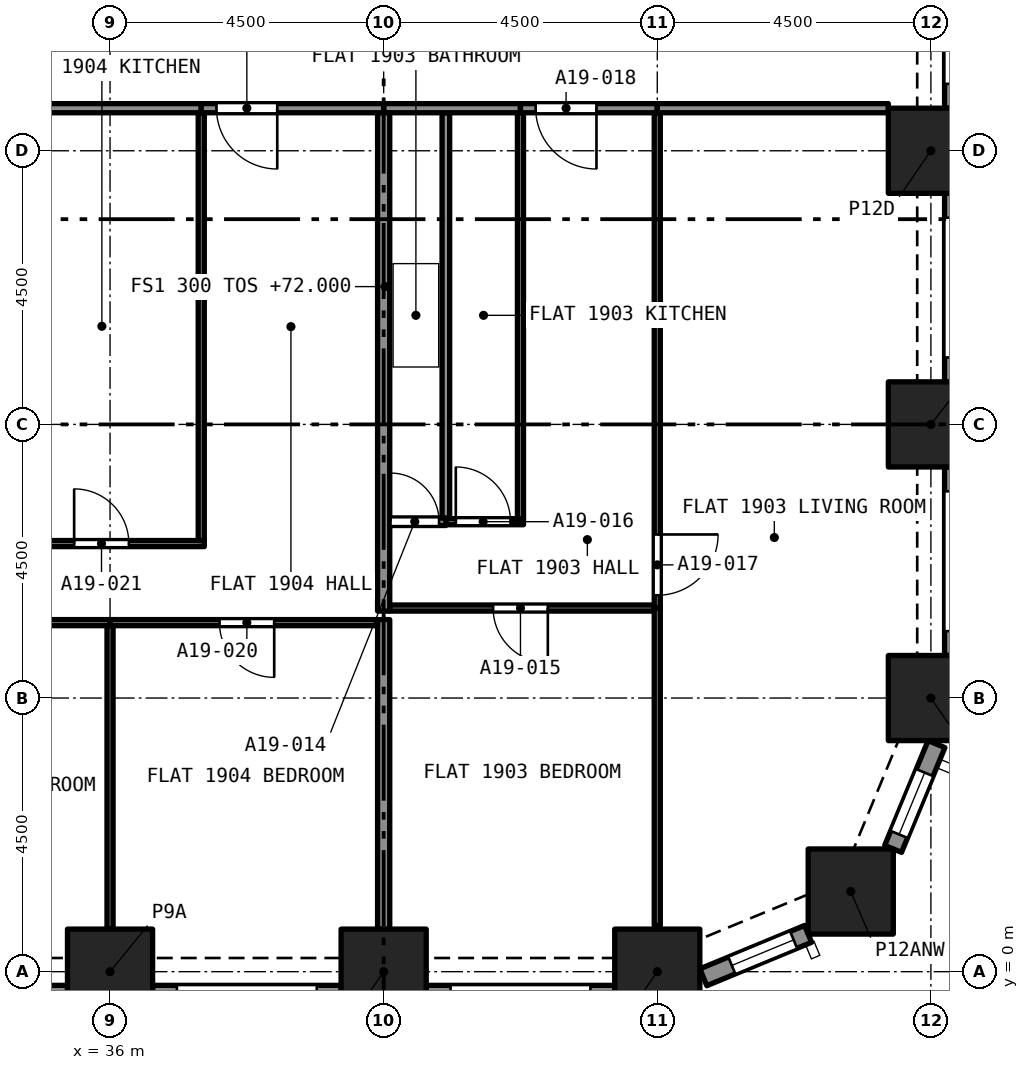
"""IFC4 building model, lengths in metres.
Left out: names, types, materials, properties, quantities, classifications, styles, units other than length and angle.
Written with IfcOpenShell. Run it as: python <this file> out.ifc"""

import sys

from ifc_helpers import new_model, si_unit, direction, frame, frame_2d, origin, origin_2d, place, context, subcontext, project, spatial, rectangle, extrude, element, fill, save


model = new_model("IFC4")
c1 = context("Model", 3, precision=1e-05, world=origin(), true_north=direction((0.0, 1.0)))
c2 = subcontext(c1, "Body", "Model", "MODEL_VIEW")
j1 = project(units=[si_unit("LENGTHUNIT", "METRE"), si_unit("PLANEANGLEUNIT", "RADIAN")], contexts=[c1])
p1 = place(None, origin())
s1 = spatial("IfcSite", under=j1, at=p1, CompositionType="ELEMENT")
p2 = place(p1, origin())
s2 = spatial("IfcBuilding", under=s1, at=p2, CompositionType="ELEMENT")
p3 = place(p2, frame((0.0, 0.0, 72.0)))
s3 = spatial("IfcBuildingStorey", under=s2, at=p3, CompositionType="ELEMENT", Elevation=72.0)
for number, where, z_axis, x_axis in (
    (1, (36.0, 0.0, 0.0), (0.0, 0.0, 1.0), (1.0, 0.0, 0.0)),
    (2, (40.5, 0.0, 0.0), (0.0, 0.0, 1.0), (1.0, 0.0, 0.0)),
    (3, (45.0, 0.0, 0.0), (0.0, 0.0, 1.0), (1.0, 0.0, 0.0)),
    (4, (48.182, 1.318, 0.0), (0.0, 0.0, 1.0), (1.0, 0.0, 0.0)),
    (5, (49.5, 4.5, 0.0), (0.0, 0.0, 1.0), (1.0, 0.0, 0.0)),
    (6, (49.5, 9.0, 0.0), (0.0, 0.0, 1.0), (1.0, 0.0, 0.0)),
    (7, (49.5, 13.5, 0.0), (0.0, 0.0, 1.0), (1.0, 0.0, 0.0)),
):
    element("IfcColumn", number, at=place(p3, frame(where, z_axis=z_axis, x_axis=x_axis)), inside=s3, PredefinedType="COLUMN", context=c2, shape_type="SweptSolid", body=[
        extrude(rectangle(XDim=1.4, YDim=1.4, at=origin_2d()), origin(), (0.0, 0.0, 1.0), 3.2),
    ])
p4 = place(p3, frame((35.3, -0.375, 0.0), z_axis=(0.0, 0.0, 1.0), x_axis=(-1.0, 0.0, 0.0)))
e8 = element("IfcWall", 8, at=p4, inside=s3, PredefinedType="SOLIDWALL", context=c2, shape_type="SweptSolid", body=[
    extrude(rectangle(XDim=3.1, YDim=0.3, at=frame_2d((1.55, 0.0))), origin(), (0.0, 0.0, 1.0), 3.2),
])
p5 = place(p4, frame((0.4, 0.0, 0.45)))
e9 = element("IfcOpeningElement", 9, at=p5, cuts=e8, PredefinedType="OPENING", context=c2, shape_type="SweptSolid", body=[
    extrude(rectangle(XDim=2.3, YDim=1.95, at=frame_2d((1.15, 0.975))), frame((0.0, 0.16, 0.0), z_axis=(0.0, -1.0, 0.0), x_axis=(1.0, 0.0, 0.0)), (0.0, 0.0, 1.0), 0.32),
])
p6 = place(p3, frame((39.8, -0.375, 0.0), z_axis=(0.0, 0.0, 1.0), x_axis=(-1.0, 0.0, 0.0)))
e10 = element("IfcWall", 10, at=p6, inside=s3, PredefinedType="SOLIDWALL", context=c2, shape_type="SweptSolid", body=[
    extrude(rectangle(XDim=3.1, YDim=0.3, at=frame_2d((1.55, 0.0))), origin(), (0.0, 0.0, 1.0), 3.2),
])
p7 = place(p6, frame((0.4, 0.0, 0.45)))
e11 = element("IfcOpeningElement", 11, at=p7, cuts=e10, PredefinedType="OPENING", context=c2, shape_type="SweptSolid", body=[
    extrude(rectangle(XDim=2.3, YDim=1.95, at=frame_2d((1.15, 0.975))), frame((0.0, 0.16, 0.0), z_axis=(0.0, -1.0, 0.0), x_axis=(1.0, 0.0, 0.0)), (0.0, 0.0, 1.0), 0.32),
])
p8 = place(p3, frame((44.3, -0.375, 0.0), z_axis=(0.0, 0.0, 1.0), x_axis=(-1.0, 0.0, 0.0)))
e12 = element("IfcWall", 12, at=p8, inside=s3, PredefinedType="SOLIDWALL", context=c2, shape_type="SweptSolid", body=[
    extrude(rectangle(XDim=3.1, YDim=0.3, at=frame_2d((1.55, 0.0))), origin(), (0.0, 0.0, 1.0), 3.2),
])
p9 = place(p8, frame((0.4, 0.0, 0.45)))
e13 = element("IfcOpeningElement", 13, at=p9, cuts=e12, PredefinedType="OPENING", context=c2, shape_type="SweptSolid", body=[
    extrude(rectangle(XDim=2.3, YDim=1.95, at=frame_2d((1.15, 0.975))), frame((0.0, 0.16, 0.0), z_axis=(0.0, -1.0, 0.0), x_axis=(1.0, 0.0, 0.0)), (0.0, 0.0, 1.0), 0.32),
])
p10 = place(p3, frame((47.48, 0.622, 0.0), z_axis=(0.0, 0.0, 1.0), x_axis=(-0.923903565336, -0.38262540684, 0.0)))
e14 = element("IfcWall", 14, at=p10, inside=s3, PredefinedType="SOLIDWALL", context=c2, shape_type="SweptSolid", body=[
    extrude(rectangle(XDim=1.865, YDim=0.3, at=frame_2d((0.933, 0.0))), origin(), (0.0, 0.0, 1.0), 3.2),
])
p11 = place(p10, frame((0.258, 0.0, 0.45)))
e15 = element("IfcOpeningElement", 15, at=p11, cuts=e14, PredefinedType="OPENING", context=c2, shape_type="SweptSolid", body=[
    extrude(rectangle(XDim=1.1, YDim=1.95, at=frame_2d((0.55, 0.975))), frame((0.0, 0.16, 0.0), z_axis=(0.0, -1.0, 0.0), x_axis=(1.0, 0.0, 0.0)), (0.0, 0.0, 1.0), 0.32),
])
p12 = place(p3, frame((49.592, 3.743, 0.0), z_axis=(0.0, 0.0, 1.0), x_axis=(-0.382737135771, -0.923857286003, 0.0)))
e16 = element("IfcWall", 16, at=p12, inside=s3, PredefinedType="SOLIDWALL", context=c2, shape_type="SweptSolid", body=[
    extrude(rectangle(XDim=1.865, YDim=0.3, at=frame_2d((0.933, 0.0))), origin(), (0.0, 0.0, 1.0), 3.2),
])
p13 = place(p12, frame((0.508, 0.0, 0.45)))
e17 = element("IfcOpeningElement", 17, at=p13, cuts=e16, PredefinedType="OPENING", context=c2, shape_type="SweptSolid", body=[
    extrude(rectangle(XDim=1.1, YDim=1.95, at=frame_2d((0.55, 0.975))), frame((0.0, 0.16, 0.0), z_axis=(0.0, -1.0, 0.0), x_axis=(1.0, 0.0, 0.0)), (0.0, 0.0, 1.0), 0.32),
])
p14 = place(p3, frame((49.875, 8.3, 0.0), z_axis=(0.0, 0.0, 1.0), x_axis=(0.0, -1.0, 0.0)))
e18 = element("IfcWall", 18, at=p14, inside=s3, PredefinedType="SOLIDWALL", context=c2, shape_type="SweptSolid", body=[
    extrude(rectangle(XDim=3.1, YDim=0.3, at=frame_2d((1.55, 0.0))), origin(), (0.0, 0.0, 1.0), 3.2),
])
p15 = place(p14, frame((0.4, 0.0, 0.45)))
e19 = element("IfcOpeningElement", 19, at=p15, cuts=e18, PredefinedType="OPENING", context=c2, shape_type="SweptSolid", body=[
    extrude(rectangle(XDim=2.3, YDim=1.95, at=frame_2d((1.15, 0.975))), frame((0.0, 0.16, 0.0), z_axis=(0.0, -1.0, 0.0), x_axis=(1.0, 0.0, 0.0)), (0.0, 0.0, 1.0), 0.32),
])
p16 = place(p3, frame((49.875, 12.8, 0.0), z_axis=(0.0, 0.0, 1.0), x_axis=(0.0, -1.0, 0.0)))
e20 = element("IfcWall", 20, at=p16, inside=s3, PredefinedType="SOLIDWALL", context=c2, shape_type="SweptSolid", body=[
    extrude(rectangle(XDim=3.1, YDim=0.3, at=frame_2d((1.55, 0.0))), origin(), (0.0, 0.0, 1.0), 3.2),
])
p17 = place(p16, frame((0.4, 0.0, 0.45)))
e21 = element("IfcOpeningElement", 21, at=p17, cuts=e20, PredefinedType="OPENING", context=c2, shape_type="SweptSolid", body=[
    extrude(rectangle(XDim=2.3, YDim=1.95, at=frame_2d((1.15, 0.975))), frame((0.0, 0.16, 0.0), z_axis=(0.0, -1.0, 0.0), x_axis=(1.0, 0.0, 0.0)), (0.0, 0.0, 1.0), 0.32),
])
p18 = place(p3, frame((49.875, 17.3, 0.0), z_axis=(0.0, 0.0, 1.0), x_axis=(0.0, -1.0, 0.0)))
e22 = element("IfcWall", 22, at=p18, inside=s3, PredefinedType="SOLIDWALL", context=c2, shape_type="SweptSolid", body=[
    extrude(rectangle(XDim=3.1, YDim=0.3, at=frame_2d((1.55, 0.0))), origin(), (0.0, 0.0, 1.0), 3.2),
])
p19 = place(p18, frame((0.4, 0.0, 0.45)))
e23 = element("IfcOpeningElement", 23, at=p19, cuts=e22, PredefinedType="OPENING", context=c2, shape_type="SweptSolid", body=[
    extrude(rectangle(XDim=2.3, YDim=1.95, at=frame_2d((1.15, 0.975))), frame((0.0, 0.16, 0.0), z_axis=(0.0, -1.0, 0.0), x_axis=(1.0, 0.0, 0.0)), (0.0, 0.0, 1.0), 0.32),
])
p20 = place(p3, frame((40.6, 7.4, 0.0), z_axis=(0.0, 0.0, 1.0), x_axis=(1.0, 0.0, 0.0)))
e24 = element("IfcWall", 24, at=p20, inside=s3, PredefinedType="PARTITIONING", context=c2, shape_type="SweptSolid", body=[
    extrude(rectangle(XDim=0.923, YDim=0.125, at=frame_2d((0.461, 0.0))), origin(), (0.0, 0.0, 1.0), 2.7),
])
p21 = place(p20, frame((0.011, 0.0, 0.0)))
e25 = element("IfcOpeningElement", 25, at=p21, cuts=e24, PredefinedType="OPENING", context=c2, shape_type="SweptSolid", body=[
    extrude(rectangle(XDim=0.8, YDim=2.1, at=frame_2d((0.4, 1.05))), frame((0.0, 0.073, 0.0), z_axis=(0.0, -1.0, 0.0), x_axis=(1.0, 0.0, 0.0)), (0.0, 0.0, 1.0), 0.145),
])
p22 = place(p3, frame((41.523, 7.462, 0.0), z_axis=(0.0, 0.0, 1.0), x_axis=(0.0, 1.0, 0.0)))
e26 = element("IfcWall", 26, at=p22, inside=s3, PredefinedType="PARTITIONING", context=c2, shape_type="SweptSolid", body=[
    extrude(rectangle(XDim=6.663, YDim=0.125, at=frame_2d((3.331, 0.0))), origin(), (0.0, 0.0, 1.0), 2.7),
])
p23 = place(p3, frame((40.5, 14.2, 0.0), z_axis=(0.0, 0.0, 1.0), x_axis=(1.0, 0.0, 0.0)))
e27 = element("IfcWall", 27, at=p23, inside=s3, PredefinedType="PARTITIONING", context=c2, shape_type="SweptSolid", body=[
    extrude(rectangle(XDim=2.25, YDim=0.15, at=frame_2d((1.125, 0.0))), origin(), (0.0, 0.0, 1.0), 2.7),
])
p24 = place(p3, frame((44.95, 5.98, 0.0), z_axis=(0.0, 0.0, 1.0), x_axis=(-1.0, 0.0, 0.0)))
e28 = element("IfcWall", 28, at=p24, inside=s3, PredefinedType="PARTITIONING", context=c2, shape_type="SweptSolid", body=[
    extrude(rectangle(XDim=4.35, YDim=0.1, at=frame_2d((2.175, 0.0))), origin(), (0.0, 0.0, 1.0), 2.7),
])
p25 = place(p24, frame((1.75, 0.0, 0.0)))
e29 = element("IfcOpeningElement", 29, at=p25, cuts=e28, PredefinedType="OPENING", context=c2, shape_type="SweptSolid", body=[
    extrude(rectangle(XDim=0.9, YDim=2.1, at=frame_2d((0.45, 1.05))), frame((0.0, 0.06, 0.0), z_axis=(0.0, -1.0, 0.0), x_axis=(1.0, 0.0, 0.0)), (0.0, 0.0, 1.0), 0.12),
])
p26 = place(p3, frame((45.0, 0.758, 0.0), z_axis=(0.0, 0.0, 1.0), x_axis=(0.0, 1.0, 0.0)))
e30 = element("IfcWall", 30, at=p26, inside=s3, PredefinedType="PARTITIONING", context=c2, shape_type="SweptSolid", body=[
    extrude(rectangle(XDim=5.222, YDim=0.1, at=frame_2d((2.611, 0.0))), origin(), (0.0, 0.0, 1.0), 2.7),
])
p27 = place(p3, frame((40.5, 0.7, 0.0), z_axis=(0.0, 0.0, 1.0), x_axis=(0.0, 1.0, 0.0)))
e31 = element("IfcWall", 31, at=p27, inside=s3, PredefinedType="PARTITIONING", context=c2, shape_type="SweptSolid", body=[
    extrude(rectangle(XDim=5.09, YDim=0.2, at=frame_2d((2.545, 0.0))), origin(), (0.0, 0.0, 1.0), 2.7),
])
p28 = place(p3, frame((41.523, 7.4, 0.0), z_axis=(0.0, 0.0, 1.0), x_axis=(1.0, 0.0, 0.0)))
e32 = element("IfcWall", 32, at=p28, inside=s3, PredefinedType="PARTITIONING", context=c2, shape_type="SweptSolid", body=[
    extrude(rectangle(XDim=1.277, YDim=0.1, at=frame_2d((0.639, 0.0))), origin(), (0.0, 0.0, 1.0), 2.7),
])
p29 = place(p28, frame((0.164, 0.0, 0.0)))
e33 = element("IfcOpeningElement", 33, at=p29, cuts=e32, PredefinedType="OPENING", context=c2, shape_type="SweptSolid", body=[
    extrude(rectangle(XDim=0.9, YDim=2.1, at=frame_2d((0.45, 1.05))), frame((0.0, 0.06, 0.0), z_axis=(0.0, -1.0, 0.0), x_axis=(1.0, 0.0, 0.0)), (0.0, 0.0, 1.0), 0.12),
])
p30 = place(p3, frame((42.75, 7.45, 0.0), z_axis=(0.0, 0.0, 1.0), x_axis=(0.0, 1.0, 0.0)))
e34 = element("IfcWall", 34, at=p30, inside=s3, PredefinedType="PARTITIONING", context=c2, shape_type="SweptSolid", body=[
    extrude(rectangle(XDim=6.675, YDim=0.1, at=frame_2d((3.337, 0.0))), origin(), (0.0, 0.0, 1.0), 2.7),
])
p31 = place(p3, frame((45.0, 14.125, 0.0), z_axis=(0.0, 0.0, 1.0), x_axis=(0.0, -1.0, 0.0)))
e35 = element("IfcWall", 35, at=p31, inside=s3, PredefinedType="PARTITIONING", context=c2, shape_type="SweptSolid", body=[
    extrude(rectangle(XDim=8.145, YDim=0.1, at=frame_2d((4.073, 0.0))), origin(), (0.0, 0.0, 1.0), 2.7),
])
p32 = place(p31, frame((6.935, 0.0, 0.0)))
e36 = element("IfcOpeningElement", 36, at=p32, cuts=e35, PredefinedType="OPENING", context=c2, shape_type="SweptSolid", body=[
    extrude(rectangle(XDim=1.0, YDim=2.1, at=frame_2d((0.5, 1.05))), frame((0.0, 0.06, 0.0), z_axis=(0.0, -1.0, 0.0), x_axis=(1.0, 0.0, 0.0)), (0.0, 0.0, 1.0), 0.12),
])
p33 = place(p3, frame((40.5, 5.93, 0.0), z_axis=(0.0, 0.0, 1.0), x_axis=(0.0, 1.0, 0.0)))
e37 = element("IfcWall", 37, at=p33, inside=s3, PredefinedType="PARTITIONING", context=c2, shape_type="SweptSolid", body=[
    extrude(rectangle(XDim=8.195, YDim=0.2, at=frame_2d((4.098, 0.0))), origin(), (0.0, 0.0, 1.0), 2.7),
])
p34 = place(p3, frame((45.0, 14.2, 0.0), z_axis=(0.0, 0.0, 1.0), x_axis=(-1.0, 0.0, 0.0)))
e38 = element("IfcWall", 38, at=p34, inside=s3, PredefinedType="PARTITIONING", context=c2, shape_type="SweptSolid", body=[
    extrude(rectangle(XDim=2.25, YDim=0.15, at=frame_2d((1.125, 0.0))), origin(), (0.0, 0.0, 1.0), 2.7),
])
p35 = place(p34, frame((1.0, 0.0, 0.0)))
e39 = element("IfcOpeningElement", 39, at=p35, cuts=e38, PredefinedType="OPENING", context=c2, shape_type="SweptSolid", body=[
    extrude(rectangle(XDim=1.0, YDim=2.1, at=frame_2d((0.5, 1.05))), frame((0.0, 0.085, 0.0), z_axis=(0.0, -1.0, 0.0), x_axis=(1.0, 0.0, 0.0)), (0.0, 0.0, 1.0), 0.17),
])
p36 = place(p3, frame((45.0, 14.2, 0.0), z_axis=(0.0, 0.0, 1.0), x_axis=(1.0, 0.0, 0.0)))
e40 = element("IfcWall", 40, at=p36, inside=s3, PredefinedType="PARTITIONING", context=c2, shape_type="SweptSolid", body=[
    extrude(rectangle(XDim=3.8, YDim=0.15, at=frame_2d((1.9, 0.0))), origin(), (0.0, 0.0, 1.0), 2.7),
])
p37 = place(p3, frame((32.2, 14.2, 0.0), z_axis=(0.0, 0.0, 1.0), x_axis=(1.0, 0.0, 0.0)))
e41 = element("IfcWall", 41, at=p37, inside=s3, PredefinedType="PARTITIONING", context=c2, shape_type="SweptSolid", body=[
    extrude(rectangle(XDim=5.3, YDim=0.15, at=frame_2d((2.65, 0.0))), origin(), (0.0, 0.0, 1.0), 2.7),
])
p38 = place(p3, frame((40.4, 5.74, 0.0), z_axis=(0.0, 0.0, 1.0), x_axis=(-1.0, 0.0, 0.0)))
e42 = element("IfcWall", 42, at=p38, inside=s3, PredefinedType="PARTITIONING", context=c2, shape_type="SweptSolid", body=[
    extrude(rectangle(XDim=4.4, YDim=0.1, at=frame_2d((2.2, 0.0))), origin(), (0.0, 0.0, 1.0), 2.7),
])
p39 = place(p38, frame((1.7, 0.0, 0.0)))
e43 = element("IfcOpeningElement", 43, at=p39, cuts=e42, PredefinedType="OPENING", context=c2, shape_type="SweptSolid", body=[
    extrude(rectangle(XDim=0.9, YDim=2.1, at=frame_2d((0.45, 1.05))), frame((0.0, 0.06, 0.0), z_axis=(0.0, -1.0, 0.0), x_axis=(1.0, 0.0, 0.0)), (0.0, 0.0, 1.0), 0.12),
])
p40 = place(p3, frame((36.0, 0.7, 0.0), z_axis=(0.0, 0.0, 1.0), x_axis=(0.0, 1.0, 0.0)))
e44 = element("IfcWall", 44, at=p40, inside=s3, PredefinedType="PARTITIONING", context=c2, shape_type="SweptSolid", body=[
    extrude(rectangle(XDim=4.99, YDim=0.1, at=frame_2d((2.495, 0.0))), origin(), (0.0, 0.0, 1.0), 2.7),
])
p41 = place(p3, frame((34.219, 7.04, 0.0), z_axis=(0.0, 0.0, 1.0), x_axis=(1.0, 0.0, 0.0)))
e45 = element("IfcWall", 45, at=p41, inside=s3, PredefinedType="PARTITIONING", context=c2, shape_type="SweptSolid", body=[
    extrude(rectangle(XDim=3.331, YDim=0.1, at=frame_2d((1.666, 0.0))), origin(), (0.0, 0.0, 1.0), 2.7),
])
p42 = place(p41, frame((1.19, 0.0, 0.0)))
e46 = element("IfcOpeningElement", 46, at=p42, cuts=e45, PredefinedType="OPENING", context=c2, shape_type="SweptSolid", body=[
    extrude(rectangle(XDim=0.9, YDim=2.1, at=frame_2d((0.45, 1.05))), frame((0.0, 0.06, 0.0), z_axis=(0.0, -1.0, 0.0), x_axis=(1.0, 0.0, 0.0)), (0.0, 0.0, 1.0), 0.12),
])
p43 = place(p3, frame((37.5, 7.09, 0.0), z_axis=(0.0, 0.0, 1.0), x_axis=(0.0, 1.0, 0.0)))
e47 = element("IfcWall", 47, at=p43, inside=s3, PredefinedType="PARTITIONING", context=c2, shape_type="SweptSolid", body=[
    extrude(rectangle(XDim=7.035, YDim=0.1, at=frame_2d((3.518, 0.0))), origin(), (0.0, 0.0, 1.0), 2.7),
])
p44 = place(p3, frame((36.0, 5.74, 0.0), z_axis=(0.0, 0.0, 1.0), x_axis=(-1.0, 0.0, 0.0)))
e48 = element("IfcWall", 48, at=p44, inside=s3, PredefinedType="PARTITIONING", context=c2, shape_type="SweptSolid", body=[
    extrude(rectangle(XDim=4.375, YDim=0.1, at=frame_2d((2.188, 0.0))), origin(), (0.0, 0.0, 1.0), 2.7),
])
p45 = place(p44, frame((1.75, 0.0, 0.0)))
e49 = element("IfcOpeningElement", 49, at=p45, cuts=e48, PredefinedType="OPENING", context=c2, shape_type="SweptSolid", body=[
    extrude(rectangle(XDim=1.0, YDim=2.1, at=frame_2d((0.5, 1.05))), frame((0.0, 0.06, 0.0), z_axis=(0.0, -1.0, 0.0), x_axis=(1.0, 0.0, 0.0)), (0.0, 0.0, 1.0), 0.12),
])
p46 = place(p3, frame((40.5, 14.2, 0.0), z_axis=(0.0, 0.0, 1.0), x_axis=(-1.0, 0.0, 0.0)))
e50 = element("IfcWall", 50, at=p46, inside=s3, PredefinedType="PARTITIONING", context=c2, shape_type="SweptSolid", body=[
    extrude(rectangle(XDim=3.0, YDim=0.15, at=frame_2d((1.5, 0.0))), origin(), (0.0, 0.0, 1.0), 2.7),
])
p47 = place(p46, frame((1.75, 0.0, 0.0)))
e51 = element("IfcOpeningElement", 51, at=p47, cuts=e50, PredefinedType="OPENING", context=c2, shape_type="SweptSolid", body=[
    extrude(rectangle(XDim=1.0, YDim=2.1, at=frame_2d((0.5, 1.05))), frame((0.0, 0.085, 0.0), z_axis=(0.0, -1.0, 0.0), x_axis=(1.0, 0.0, 0.0)), (0.0, 0.0, 1.0), 0.17),
])
p48 = place(p11, origin())
e52 = element("IfcWindow", 52, at=p48, inside=s3, PartitioningType="SINGLE_PANEL", PredefinedType="WINDOW", context=c2, shape_type="SweptSolid", body=[
    extrude(rectangle(XDim=1.1, YDim=1.95, at=frame_2d((0.55, 0.975))), frame((0.0, 0.03, 0.0), z_axis=(0.0, -1.0, 0.0), x_axis=(1.0, 0.0, 0.0)), (0.0, 0.0, 1.0), 0.06),
])
fill(e15, e52)
p49 = place(p13, origin())
e53 = element("IfcWindow", 53, at=p49, inside=s3, PartitioningType="SINGLE_PANEL", PredefinedType="WINDOW", context=c2, shape_type="SweptSolid", body=[
    extrude(rectangle(XDim=1.1, YDim=1.95, at=frame_2d((0.55, 0.975))), frame((0.0, 0.03, 0.0), z_axis=(0.0, -1.0, 0.0), x_axis=(1.0, 0.0, 0.0)), (0.0, 0.0, 1.0), 0.06),
])
fill(e17, e53)
p50 = place(p21, origin())
e54 = element("IfcDoor", 54, at=p50, inside=s3, OperationType="SINGLE_SWING_LEFT", PredefinedType="DOOR", context=c2, shape_type="SweptSolid", body=[
    extrude(rectangle(XDim=0.8, YDim=2.1, at=frame_2d((0.4, 1.05))), frame((0.0, 0.025, 0.0), z_axis=(0.0, -1.0, 0.0), x_axis=(1.0, 0.0, 0.0)), (0.0, 0.0, 1.0), 0.05),
])
fill(e25, e54)
p51 = place(p25, origin())
e55 = element("IfcDoor", 55, at=p51, inside=s3, OperationType="SINGLE_SWING_RIGHT", PredefinedType="DOOR", context=c2, shape_type="SweptSolid", body=[
    extrude(rectangle(XDim=0.9, YDim=2.1, at=frame_2d((0.45, 1.05))), frame((0.0, 0.025, 0.0), z_axis=(0.0, -1.0, 0.0), x_axis=(1.0, 0.0, 0.0)), (0.0, 0.0, 1.0), 0.05),
])
fill(e29, e55)
p52 = place(p29, origin())
e56 = element("IfcDoor", 56, at=p52, inside=s3, OperationType="SINGLE_SWING_LEFT", PredefinedType="DOOR", context=c2, shape_type="SweptSolid", body=[
    extrude(rectangle(XDim=0.9, YDim=2.1, at=frame_2d((0.45, 1.05))), frame((0.0, 0.025, 0.0), z_axis=(0.0, -1.0, 0.0), x_axis=(1.0, 0.0, 0.0)), (0.0, 0.0, 1.0), 0.05),
])
fill(e33, e56)
p53 = place(p32, origin())
e57 = element("IfcDoor", 57, at=p53, inside=s3, OperationType="SINGLE_SWING_RIGHT", PredefinedType="DOOR", context=c2, shape_type="SweptSolid", body=[
    extrude(rectangle(XDim=1.0, YDim=2.1, at=frame_2d((0.5, 1.05))), frame((0.0, 0.025, 0.0), z_axis=(0.0, -1.0, 0.0), x_axis=(1.0, 0.0, 0.0)), (0.0, 0.0, 1.0), 0.05),
])
fill(e36, e57)
p54 = place(p35, origin())
e58 = element("IfcDoor", 58, at=p54, inside=s3, OperationType="SINGLE_SWING_RIGHT", PredefinedType="DOOR", context=c2, shape_type="SweptSolid", body=[
    extrude(rectangle(XDim=1.0, YDim=2.1, at=frame_2d((0.5, 1.05))), frame((0.0, 0.025, 0.0), z_axis=(0.0, -1.0, 0.0), x_axis=(1.0, 0.0, 0.0)), (0.0, 0.0, 1.0), 0.05),
])
fill(e39, e58)
p55 = place(p39, origin())
e59 = element("IfcDoor", 59, at=p55, inside=s3, OperationType="SINGLE_SWING_LEFT", PredefinedType="DOOR", context=c2, shape_type="SweptSolid", body=[
    extrude(rectangle(XDim=0.9, YDim=2.1, at=frame_2d((0.45, 1.05))), frame((0.0, 0.025, 0.0), z_axis=(0.0, -1.0, 0.0), x_axis=(1.0, 0.0, 0.0)), (0.0, 0.0, 1.0), 0.05),
])
fill(e43, e59)
p56 = place(p42, origin())
e60 = element("IfcDoor", 60, at=p56, inside=s3, OperationType="SINGLE_SWING_LEFT", PredefinedType="DOOR", context=c2, shape_type="SweptSolid", body=[
    extrude(rectangle(XDim=0.9, YDim=2.1, at=frame_2d((0.45, 1.05))), frame((0.0, 0.025, 0.0), z_axis=(0.0, -1.0, 0.0), x_axis=(1.0, 0.0, 0.0)), (0.0, 0.0, 1.0), 0.05),
])
fill(e46, e60)
p57 = place(p47, origin())
e61 = element("IfcDoor", 61, at=p57, inside=s3, OperationType="SINGLE_SWING_RIGHT", PredefinedType="DOOR", context=c2, shape_type="SweptSolid", body=[
    extrude(rectangle(XDim=1.0, YDim=2.1, at=frame_2d((0.5, 1.05))), frame((0.0, 0.025, 0.0), z_axis=(0.0, -1.0, 0.0), x_axis=(1.0, 0.0, 0.0)), (0.0, 0.0, 1.0), 0.05),
])
fill(e51, e61)
save(model, sys.argv[1])
